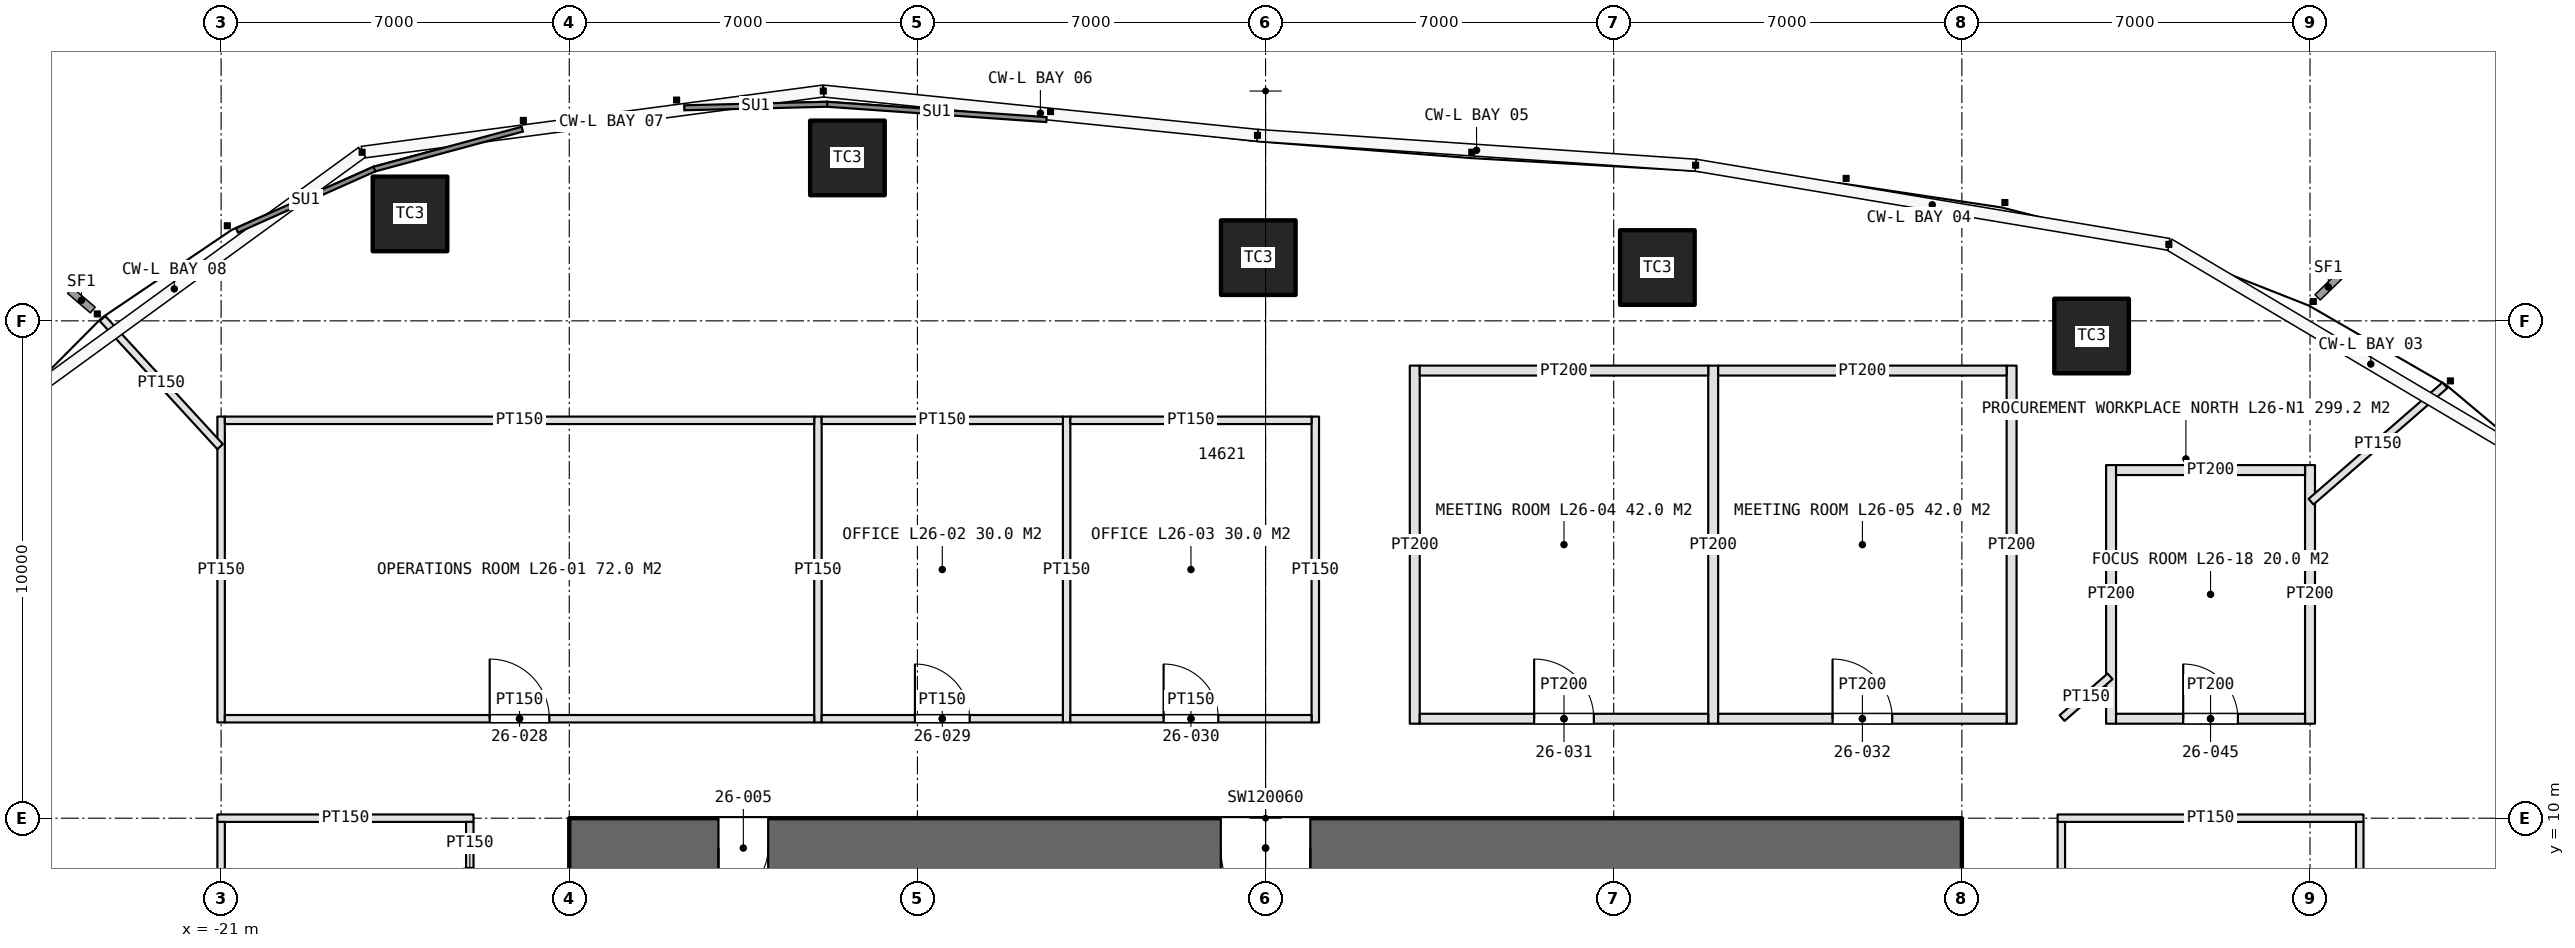
"""IFC4 building model, lengths in metres.
Left out: names, types, materials, properties, quantities, classifications, styles, units other than length and angle.
Written with IfcOpenShell. Run it as: python <this file> out.ifc"""

import sys

from ifc_helpers import new_model, si_unit, direction, frame, frame_2d, origin, origin_2d, place, context, subcontext, project, spatial, rectangle, extrude, element, fill, save


model = new_model("IFC4")
c1 = context("Model", 3, precision=1e-05, world=origin(), true_north=direction((0.0, 1.0)))
c2 = subcontext(c1, "Body", "Model", "MODEL_VIEW")
j1 = project(units=[si_unit("LENGTHUNIT", "METRE"), si_unit("PLANEANGLEUNIT", "RADIAN")], contexts=[c1])
p1 = place(None, origin())
s1 = spatial("IfcSite", under=j1, at=p1, CompositionType="ELEMENT")
p2 = place(p1, origin())
s2 = spatial("IfcBuilding", under=s1, at=p2, CompositionType="ELEMENT")
p3 = place(p2, frame((0.0, 0.0, 126.0)))
s3 = spatial("IfcBuildingStorey", under=s2, at=p3, CompositionType="ELEMENT", Elevation=126.0)
p4 = place(p3, frame((14.0, 9.4, 0.0), z_axis=(0.0, 0.0, 1.0), x_axis=(-1.0, 0.0, 0.0)))
e1 = element("IfcWall", 1, at=p4, inside=s3, PredefinedType="SHEAR", context=c2, shape_type="SweptSolid", body=[
    extrude(rectangle(XDim=28.0, YDim=1.2, at=frame_2d((14.0, 0.0))), origin(), (0.0, 0.0, 1.0), 4.2),
])
p5 = place(p4, frame((24.0, 0.0, 0.0)))
e2 = element("IfcOpeningElement", 2, at=p5, cuts=e1, PredefinedType="OPENING", context=c2, shape_type="SweptSolid", body=[
    extrude(rectangle(XDim=1.0, YDim=2.4, at=frame_2d((0.5, 1.2))), frame((0.0, 0.61, 0.0), z_axis=(0.0, -1.0, 0.0), x_axis=(1.0, 0.0, 0.0)), (0.0, 0.0, 1.0), 1.22),
])
p6 = place(p4, frame((13.1, 0.0, 0.0)))
e3 = element("IfcOpeningElement", 3, at=p6, cuts=e1, PredefinedType="OPENING", context=c2, shape_type="SweptSolid", body=[
    extrude(rectangle(XDim=1.8, YDim=2.4, at=frame_2d((0.9, 1.2))), frame((0.0, 0.61, 0.0), z_axis=(0.0, -1.0, 0.0), x_axis=(1.0, 0.0, 0.0)), (0.0, 0.0, 1.0), 1.22),
])
for number, where, z_axis, x_axis in (
    (4, (16.608, 19.695, 0.0), (0.0, 0.0, 1.0), (1.0, 0.0, 0.0)),
    (5, (7.878, 21.072, 0.0), (0.0, 0.0, 1.0), (1.0, 0.0, 0.0)),
    (6, (-0.146, 21.271, 0.0), (0.0, 0.0, 1.0), (1.0, 0.0, 0.0)),
    (7, (-8.407, 23.276, 0.0), (0.0, 0.0, 1.0), (1.0, 0.0, 0.0)),
    (8, (-17.202, 22.15, 0.0), (0.0, 0.0, 1.0), (1.0, 0.0, 0.0)),
):
    element("IfcColumn", number, at=place(p3, frame(where, z_axis=z_axis, x_axis=x_axis)), inside=s3, PredefinedType="COLUMN", context=c2, shape_type="SweptSolid", body=[
        extrude(rectangle(XDim=1.5, YDim=1.5, at=origin_2d()), origin(), (0.0, 0.0, 1.0), 4.2),
    ])
for number, where, z_axis, x_axis in (
    (9, (-21.0, 11.925, 0.0), (0.0, 0.0, 1.0), (0.0, 1.0, 0.0)),
    (10, (-9.0, 11.925, 0.0), (0.0, 0.0, 1.0), (0.0, 1.0, 0.0)),
    (11, (-4.0, 11.925, 0.0), (0.0, 0.0, 1.0), (0.0, 1.0, 0.0)),
    (12, (1.0, 11.925, 0.0), (0.0, 0.0, 1.0), (0.0, 1.0, 0.0)),
):
    element("IfcWall", number, at=place(p3, frame(where, z_axis=z_axis, x_axis=x_axis)), inside=s3, PredefinedType="PARTITIONING", context=c2, shape_type="SweptSolid", body=[
        extrude(rectangle(XDim=6.15, YDim=0.15, at=frame_2d((3.075, 0.0))), origin(), (0.0, 0.0, 1.0), 3.0),
    ])
p7 = place(p3, frame((-20.925, 12.0, 0.0), z_axis=(0.0, 0.0, 1.0), x_axis=(1.0, 0.0, 0.0)))
e13 = element("IfcWall", 13, at=p7, inside=s3, PredefinedType="PARTITIONING", context=c2, shape_type="SweptSolid", body=[
    extrude(rectangle(XDim=11.85, YDim=0.15, at=frame_2d((5.925, 0.0))), origin(), (0.0, 0.0, 1.0), 3.0),
])
p8 = place(p7, frame((5.325, 0.0, 0.0)))
e14 = element("IfcOpeningElement", 14, at=p8, cuts=e13, PredefinedType="OPENING", context=c2, shape_type="SweptSolid", body=[
    extrude(rectangle(XDim=1.2, YDim=2.4, at=frame_2d((0.6, 1.2))), frame((0.0, 0.085, 0.0), z_axis=(0.0, -1.0, 0.0), x_axis=(1.0, 0.0, 0.0)), (0.0, 0.0, 1.0), 0.17),
])
p9 = place(p3, frame((-20.925, 18.0, 0.0), z_axis=(0.0, 0.0, 1.0), x_axis=(1.0, 0.0, 0.0)))
e15 = element("IfcWall", 15, at=p9, inside=s3, PredefinedType="PARTITIONING", context=c2, shape_type="SweptSolid", body=[
    extrude(rectangle(XDim=11.85, YDim=0.15, at=frame_2d((5.925, 0.0))), origin(), (0.0, 0.0, 1.0), 3.0),
])
p10 = place(p3, frame((-8.925, 12.0, 0.0), z_axis=(0.0, 0.0, 1.0), x_axis=(1.0, 0.0, 0.0)))
e16 = element("IfcWall", 16, at=p10, inside=s3, PredefinedType="PARTITIONING", context=c2, shape_type="SweptSolid", body=[
    extrude(rectangle(XDim=4.85, YDim=0.15, at=frame_2d((2.425, 0.0))), origin(), (0.0, 0.0, 1.0), 3.0),
])
p11 = place(p10, frame((1.875, 0.0, 0.0)))
e17 = element("IfcOpeningElement", 17, at=p11, cuts=e16, PredefinedType="OPENING", context=c2, shape_type="SweptSolid", body=[
    extrude(rectangle(XDim=1.1, YDim=2.3, at=frame_2d((0.55, 1.15))), frame((0.0, 0.085, 0.0), z_axis=(0.0, -1.0, 0.0), x_axis=(1.0, 0.0, 0.0)), (0.0, 0.0, 1.0), 0.17),
])
p12 = place(p3, frame((-8.925, 18.0, 0.0), z_axis=(0.0, 0.0, 1.0), x_axis=(1.0, 0.0, 0.0)))
e18 = element("IfcWall", 18, at=p12, inside=s3, PredefinedType="PARTITIONING", context=c2, shape_type="SweptSolid", body=[
    extrude(rectangle(XDim=4.85, YDim=0.15, at=frame_2d((2.425, 0.0))), origin(), (0.0, 0.0, 1.0), 3.0),
])
p13 = place(p3, frame((-3.925, 12.0, 0.0), z_axis=(0.0, 0.0, 1.0), x_axis=(1.0, 0.0, 0.0)))
e19 = element("IfcWall", 19, at=p13, inside=s3, PredefinedType="PARTITIONING", context=c2, shape_type="SweptSolid", body=[
    extrude(rectangle(XDim=4.85, YDim=0.15, at=frame_2d((2.425, 0.0))), origin(), (0.0, 0.0, 1.0), 3.0),
])
p14 = place(p13, frame((1.875, 0.0, 0.0)))
e20 = element("IfcOpeningElement", 20, at=p14, cuts=e19, PredefinedType="OPENING", context=c2, shape_type="SweptSolid", body=[
    extrude(rectangle(XDim=1.1, YDim=2.3, at=frame_2d((0.55, 1.15))), frame((0.0, 0.085, 0.0), z_axis=(0.0, -1.0, 0.0), x_axis=(1.0, 0.0, 0.0)), (0.0, 0.0, 1.0), 0.17),
])
p15 = place(p3, frame((-3.925, 18.0, 0.0), z_axis=(0.0, 0.0, 1.0), x_axis=(1.0, 0.0, 0.0)))
e21 = element("IfcWall", 21, at=p15, inside=s3, PredefinedType="PARTITIONING", context=c2, shape_type="SweptSolid", body=[
    extrude(rectangle(XDim=4.85, YDim=0.15, at=frame_2d((2.425, 0.0))), origin(), (0.0, 0.0, 1.0), 3.0),
])
for number, where, z_axis, x_axis in (
    (22, (3.0, 11.9, 0.0), (0.0, 0.0, 1.0), (0.0, 1.0, 0.0)),
    (23, (9.0, 11.9, 0.0), (0.0, 0.0, 1.0), (0.0, 1.0, 0.0)),
    (24, (15.0, 11.9, 0.0), (0.0, 0.0, 1.0), (0.0, 1.0, 0.0)),
):
    element("IfcWall", number, at=place(p3, frame(where, z_axis=z_axis, x_axis=x_axis)), inside=s3, PredefinedType="PARTITIONING", context=c2, shape_type="SweptSolid", body=[
        extrude(rectangle(XDim=7.2, YDim=0.2, at=frame_2d((3.6, 0.0))), origin(), (0.0, 0.0, 1.0), 3.0),
    ])
p16 = place(p3, frame((3.1, 12.0, 0.0), z_axis=(0.0, 0.0, 1.0), x_axis=(1.0, 0.0, 0.0)))
e25 = element("IfcWall", 25, at=p16, inside=s3, PredefinedType="PARTITIONING", context=c2, shape_type="SweptSolid", body=[
    extrude(rectangle(XDim=5.8, YDim=0.2, at=frame_2d((2.9, 0.0))), origin(), (0.0, 0.0, 1.0), 3.0),
])
p17 = place(p16, frame((2.3, 0.0, 0.0)))
e26 = element("IfcOpeningElement", 26, at=p17, cuts=e25, PredefinedType="OPENING", context=c2, shape_type="SweptSolid", body=[
    extrude(rectangle(XDim=1.2, YDim=2.4, at=frame_2d((0.6, 1.2))), frame((0.0, 0.11, 0.0), z_axis=(0.0, -1.0, 0.0), x_axis=(1.0, 0.0, 0.0)), (0.0, 0.0, 1.0), 0.22),
])
p18 = place(p3, frame((3.1, 19.0, 0.0), z_axis=(0.0, 0.0, 1.0), x_axis=(1.0, 0.0, 0.0)))
e27 = element("IfcWall", 27, at=p18, inside=s3, PredefinedType="PARTITIONING", context=c2, shape_type="SweptSolid", body=[
    extrude(rectangle(XDim=5.8, YDim=0.2, at=frame_2d((2.9, 0.0))), origin(), (0.0, 0.0, 1.0), 3.0),
])
p19 = place(p3, frame((9.1, 12.0, 0.0), z_axis=(0.0, 0.0, 1.0), x_axis=(1.0, 0.0, 0.0)))
e28 = element("IfcWall", 28, at=p19, inside=s3, PredefinedType="PARTITIONING", context=c2, shape_type="SweptSolid", body=[
    extrude(rectangle(XDim=5.8, YDim=0.2, at=frame_2d((2.9, 0.0))), origin(), (0.0, 0.0, 1.0), 3.0),
])
p20 = place(p19, frame((2.3, 0.0, 0.0)))
e29 = element("IfcOpeningElement", 29, at=p20, cuts=e28, PredefinedType="OPENING", context=c2, shape_type="SweptSolid", body=[
    extrude(rectangle(XDim=1.2, YDim=2.4, at=frame_2d((0.6, 1.2))), frame((0.0, 0.11, 0.0), z_axis=(0.0, -1.0, 0.0), x_axis=(1.0, 0.0, 0.0)), (0.0, 0.0, 1.0), 0.22),
])
p21 = place(p3, frame((9.1, 19.0, 0.0), z_axis=(0.0, 0.0, 1.0), x_axis=(1.0, 0.0, 0.0)))
e30 = element("IfcWall", 30, at=p21, inside=s3, PredefinedType="PARTITIONING", context=c2, shape_type="SweptSolid", body=[
    extrude(rectangle(XDim=5.8, YDim=0.2, at=frame_2d((2.9, 0.0))), origin(), (0.0, 0.0, 1.0), 3.0),
])
p22 = place(p3, frame((15.925, 10.0, 0.0), z_axis=(0.0, 0.0, 1.0), x_axis=(1.0, 0.0, 0.0)))
e31 = element("IfcWall", 31, at=p22, inside=s3, PredefinedType="PARTITIONING", context=c2, shape_type="SweptSolid", body=[
    extrude(rectangle(XDim=6.15, YDim=0.15, at=frame_2d((3.075, 0.0))), origin(), (0.0, 0.0, 1.0), 3.0),
])
p23 = place(p3, frame((16.0, 5.075, 0.0), z_axis=(0.0, 0.0, 1.0), x_axis=(0.0, 1.0, 0.0)))
e32 = element("IfcWall", 32, at=p23, inside=s3, PredefinedType="PARTITIONING", context=c2, shape_type="SweptSolid", body=[
    extrude(rectangle(XDim=4.85, YDim=0.15, at=frame_2d((2.425, 0.0))), origin(), (0.0, 0.0, 1.0), 3.0),
])
p24 = place(p23, frame((1.875, 0.0, 0.0)))
e33 = element("IfcOpeningElement", 33, at=p24, cuts=e32, PredefinedType="OPENING", context=c2, shape_type="SweptSolid", body=[
    extrude(rectangle(XDim=1.1, YDim=2.3, at=frame_2d((0.55, 1.15))), frame((0.0, 0.085, 0.0), z_axis=(0.0, -1.0, 0.0), x_axis=(1.0, 0.0, 0.0)), (0.0, 0.0, 1.0), 0.17),
])
p25 = place(p3, frame((22.0, 5.075, 0.0), z_axis=(0.0, 0.0, 1.0), x_axis=(0.0, 1.0, 0.0)))
e34 = element("IfcWall", 34, at=p25, inside=s3, PredefinedType="PARTITIONING", context=c2, shape_type="SweptSolid", body=[
    extrude(rectangle(XDim=4.85, YDim=0.15, at=frame_2d((2.425, 0.0))), origin(), (0.0, 0.0, 1.0), 3.0),
])
for number, where, z_axis, x_axis in (
    (35, (17.0, 11.9, 0.0), (0.0, 0.0, 1.0), (0.0, 1.0, 0.0)),
    (36, (21.0, 11.9, 0.0), (0.0, 0.0, 1.0), (0.0, 1.0, 0.0)),
):
    element("IfcWall", number, at=place(p3, frame(where, z_axis=z_axis, x_axis=x_axis)), inside=s3, PredefinedType="PARTITIONING", context=c2, shape_type="SweptSolid", body=[
        extrude(rectangle(XDim=5.2, YDim=0.2, at=frame_2d((2.6, 0.0))), origin(), (0.0, 0.0, 1.0), 3.0),
    ])
p26 = place(p3, frame((17.1, 12.0, 0.0), z_axis=(0.0, 0.0, 1.0), x_axis=(1.0, 0.0, 0.0)))
e37 = element("IfcWall", 37, at=p26, inside=s3, PredefinedType="PARTITIONING", context=c2, shape_type="SweptSolid", body=[
    extrude(rectangle(XDim=3.8, YDim=0.2, at=frame_2d((1.9, 0.0))), origin(), (0.0, 0.0, 1.0), 3.0),
])
p27 = place(p26, frame((1.35, 0.0, 0.0)))
e38 = element("IfcOpeningElement", 38, at=p27, cuts=e37, PredefinedType="OPENING", context=c2, shape_type="SweptSolid", body=[
    extrude(rectangle(XDim=1.1, YDim=2.3, at=frame_2d((0.55, 1.15))), frame((0.0, 0.11, 0.0), z_axis=(0.0, -1.0, 0.0), x_axis=(1.0, 0.0, 0.0)), (0.0, 0.0, 1.0), 0.22),
])
p28 = place(p3, frame((17.1, 17.0, 0.0), z_axis=(0.0, 0.0, 1.0), x_axis=(1.0, 0.0, 0.0)))
e39 = element("IfcWall", 39, at=p28, inside=s3, PredefinedType="PARTITIONING", context=c2, shape_type="SweptSolid", body=[
    extrude(rectangle(XDim=3.8, YDim=0.2, at=frame_2d((1.9, 0.0))), origin(), (0.0, 0.0, 1.0), 3.0),
])
p29 = place(p3, frame((-15.925, 10.0, 0.0), z_axis=(0.0, 0.0, 1.0), x_axis=(-1.0, 0.0, 0.0)))
e40 = element("IfcWall", 40, at=p29, inside=s3, PredefinedType="PARTITIONING", context=c2, shape_type="SweptSolid", body=[
    extrude(rectangle(XDim=5.15, YDim=0.15, at=frame_2d((2.575, 0.0))), origin(), (0.0, 0.0, 1.0), 3.0),
])
p30 = place(p3, frame((-16.0, 7.075, 0.0), z_axis=(0.0, 0.0, 1.0), x_axis=(0.0, 1.0, 0.0)))
e41 = element("IfcWall", 41, at=p30, inside=s3, PredefinedType="PARTITIONING", context=c2, shape_type="SweptSolid", body=[
    extrude(rectangle(XDim=2.85, YDim=0.15, at=frame_2d((1.425, 0.0))), origin(), (0.0, 0.0, 1.0), 3.0),
])
p31 = place(p30, frame((0.925, 0.0, 0.0)))
e42 = element("IfcOpeningElement", 42, at=p31, cuts=e41, PredefinedType="OPENING", context=c2, shape_type="SweptSolid", body=[
    extrude(rectangle(XDim=1.0, YDim=2.2, at=frame_2d((0.5, 1.1))), frame((0.0, 0.085, 0.0), z_axis=(0.0, -1.0, 0.0), x_axis=(1.0, 0.0, 0.0)), (0.0, 0.0, 1.0), 0.17),
])
p32 = place(p3, frame((-21.0, 7.075, 0.0), z_axis=(0.0, 0.0, 1.0), x_axis=(0.0, 1.0, 0.0)))
e43 = element("IfcWall", 43, at=p32, inside=s3, PredefinedType="PARTITIONING", context=c2, shape_type="SweptSolid", body=[
    extrude(rectangle(XDim=2.85, YDim=0.15, at=frame_2d((1.425, 0.0))), origin(), (0.0, 0.0, 1.0), 3.0),
])
p33 = place(p3, frame((-21.02, 17.47, 0.0), z_axis=(0.0, 0.0, 1.0), x_axis=(-0.67615762792, 0.736756989927, 0.0)))
e44 = element("IfcWall", 44, at=p33, inside=s3, PredefinedType="PARTITIONING", context=c2, shape_type="SweptSolid", body=[
    extrude(rectangle(XDim=3.497, YDim=0.15, at=frame_2d((1.749, 0.0))), origin(), (0.0, 0.0, 1.0), 3.0),
])
p34 = place(p3, frame((21.02, 16.364, 0.0), z_axis=(0.0, 0.0, 1.0), x_axis=(0.75467183248, 0.656102450278, 0.0)))
e45 = element("IfcWall", 45, at=p34, inside=s3, PredefinedType="PARTITIONING", context=c2, shape_type="SweptSolid", body=[
    extrude(rectangle(XDim=3.567, YDim=0.15, at=frame_2d((1.783, 0.0))), origin(), (0.0, 0.0, 1.0), 3.0),
])
p35 = place(p3, frame((16.015, 12.013, 0.0), z_axis=(0.0, 0.0, 1.0), x_axis=(0.754654851831, 0.656121981501, 0.0)))
e46 = element("IfcWall", 46, at=p35, inside=s3, PredefinedType="PARTITIONING", context=c2, shape_type="SweptSolid", body=[
    extrude(rectangle(XDim=1.279, YDim=0.15, at=frame_2d((0.639, 0.0))), origin(), (0.0, 0.0, 1.0), 3.0),
])
p36 = place(p5, origin())
e47 = element("IfcDoor", 47, at=p36, inside=s3, OperationType="SINGLE_SWING_RIGHT", PredefinedType="DOOR", context=c2, shape_type="SweptSolid", body=[
    extrude(rectangle(XDim=1.0, YDim=2.4, at=frame_2d((0.5, 1.2))), frame((0.0, 0.025, 0.0), z_axis=(0.0, -1.0, 0.0), x_axis=(1.0, 0.0, 0.0)), (0.0, 0.0, 1.0), 0.05),
])
fill(e2, e47)
p37 = place(p6, origin())
e48 = element("IfcDoor", 48, at=p37, inside=s3, OperationType="DOUBLE_DOOR_SINGLE_SWING", PredefinedType="DOOR", context=c2, shape_type="SweptSolid", body=[
    extrude(rectangle(XDim=1.8, YDim=2.4, at=frame_2d((0.9, 1.2))), frame((0.0, 0.025, 0.0), z_axis=(0.0, -1.0, 0.0), x_axis=(1.0, 0.0, 0.0)), (0.0, 0.0, 1.0), 0.05),
])
fill(e3, e48)
p38 = place(p8, origin())
e49 = element("IfcDoor", 49, at=p38, inside=s3, OperationType="SINGLE_SWING_LEFT", PredefinedType="DOOR", context=c2, shape_type="SweptSolid", body=[
    extrude(rectangle(XDim=1.2, YDim=2.4, at=frame_2d((0.6, 1.2))), frame((0.0, 0.025, 0.0), z_axis=(0.0, -1.0, 0.0), x_axis=(1.0, 0.0, 0.0)), (0.0, 0.0, 1.0), 0.05),
])
fill(e14, e49)
p39 = place(p11, origin())
e50 = element("IfcDoor", 50, at=p39, inside=s3, OperationType="SINGLE_SWING_LEFT", PredefinedType="DOOR", context=c2, shape_type="SweptSolid", body=[
    extrude(rectangle(XDim=1.1, YDim=2.3, at=frame_2d((0.55, 1.15))), frame((0.0, 0.025, 0.0), z_axis=(0.0, -1.0, 0.0), x_axis=(1.0, 0.0, 0.0)), (0.0, 0.0, 1.0), 0.05),
])
fill(e17, e50)
p40 = place(p14, origin())
e51 = element("IfcDoor", 51, at=p40, inside=s3, OperationType="SINGLE_SWING_LEFT", PredefinedType="DOOR", context=c2, shape_type="SweptSolid", body=[
    extrude(rectangle(XDim=1.1, YDim=2.3, at=frame_2d((0.55, 1.15))), frame((0.0, 0.025, 0.0), z_axis=(0.0, -1.0, 0.0), x_axis=(1.0, 0.0, 0.0)), (0.0, 0.0, 1.0), 0.05),
])
fill(e20, e51)
p41 = place(p17, origin())
e52 = element("IfcDoor", 52, at=p41, inside=s3, OperationType="SINGLE_SWING_LEFT", PredefinedType="DOOR", context=c2, shape_type="SweptSolid", body=[
    extrude(rectangle(XDim=1.2, YDim=2.4, at=frame_2d((0.6, 1.2))), frame((0.0, 0.025, 0.0), z_axis=(0.0, -1.0, 0.0), x_axis=(1.0, 0.0, 0.0)), (0.0, 0.0, 1.0), 0.05),
])
fill(e26, e52)
p42 = place(p20, origin())
e53 = element("IfcDoor", 53, at=p42, inside=s3, OperationType="SINGLE_SWING_LEFT", PredefinedType="DOOR", context=c2, shape_type="SweptSolid", body=[
    extrude(rectangle(XDim=1.2, YDim=2.4, at=frame_2d((0.6, 1.2))), frame((0.0, 0.025, 0.0), z_axis=(0.0, -1.0, 0.0), x_axis=(1.0, 0.0, 0.0)), (0.0, 0.0, 1.0), 0.05),
])
fill(e29, e53)
p43 = place(p27, origin())
e54 = element("IfcDoor", 54, at=p43, inside=s3, OperationType="SINGLE_SWING_LEFT", PredefinedType="DOOR", context=c2, shape_type="SweptSolid", body=[
    extrude(rectangle(XDim=1.1, YDim=2.3, at=frame_2d((0.55, 1.15))), frame((0.0, 0.025, 0.0), z_axis=(0.0, -1.0, 0.0), x_axis=(1.0, 0.0, 0.0)), (0.0, 0.0, 1.0), 0.05),
])
fill(e38, e54)
save(model, sys.argv[1])
